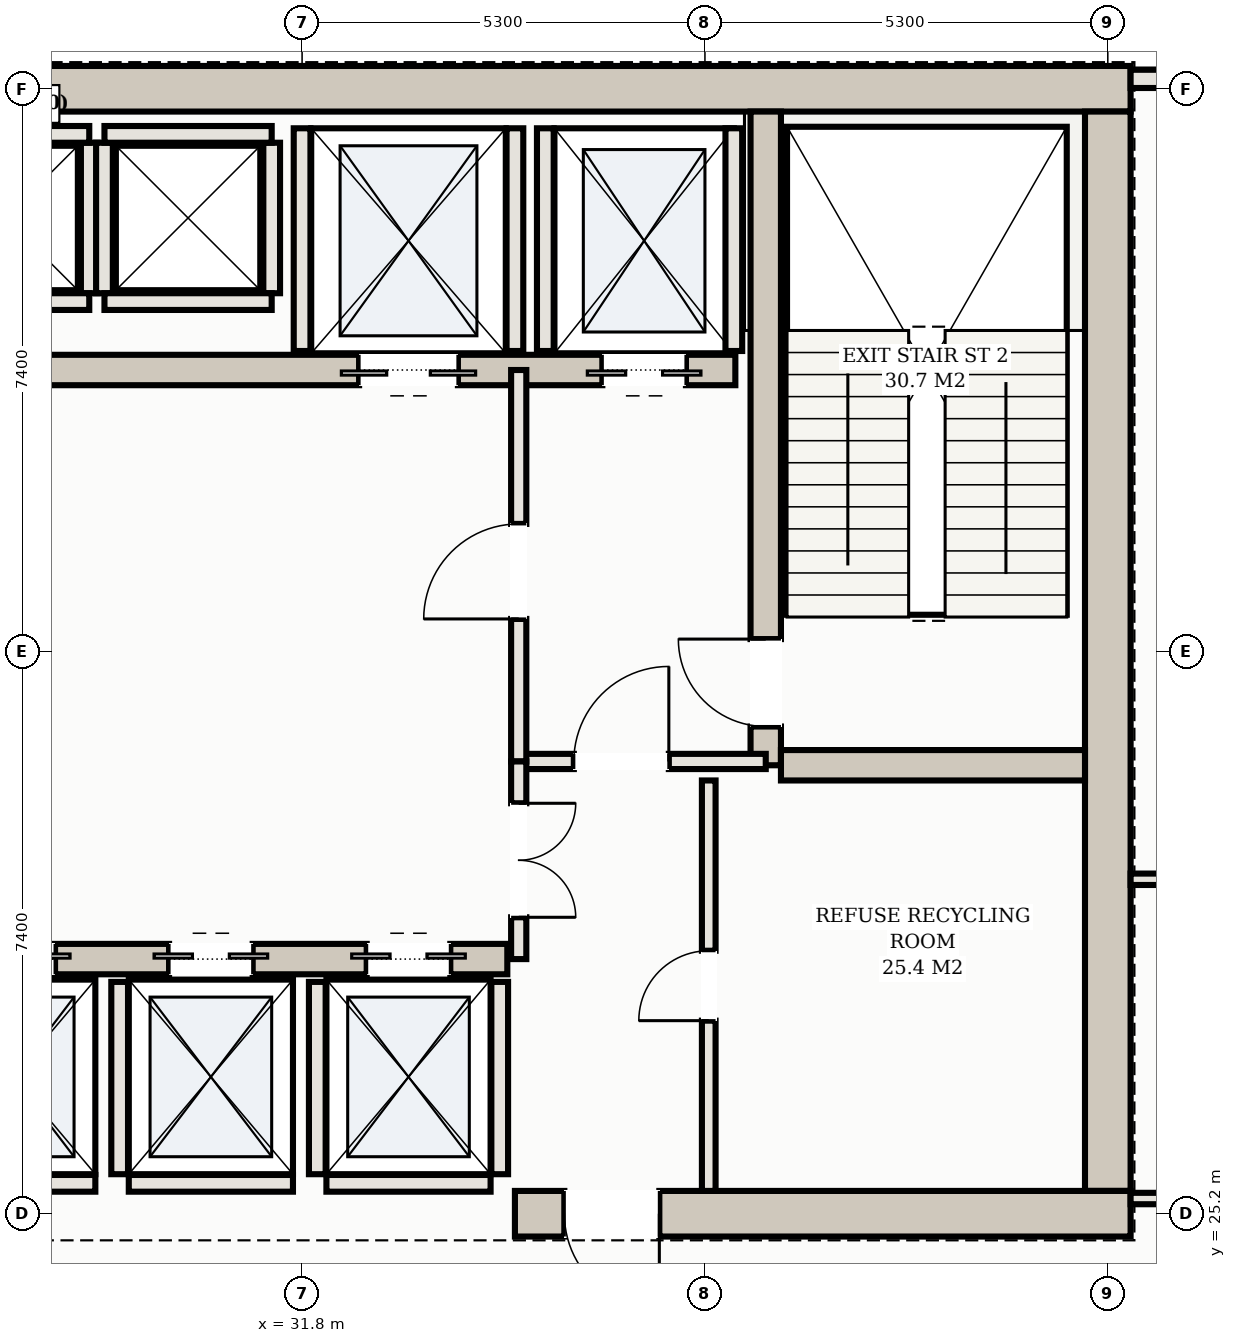
"""IFC4 building model, lengths in metres.
Left out: names, types, materials, properties, quantities, classifications, styles, units other than length and angle.
Written with IfcOpenShell. Run it as: python <this file> out.ifc"""

import sys

from ifc_helpers import new_model, si_unit, direction, frame, frame_2d, origin, place, context, subcontext, project, spatial, rectangle, extrude, element, fill, save


model = new_model("IFC4")
c1 = context("Model", 3, precision=1e-05, world=origin(), true_north=direction((0.0, 1.0)))
c2 = subcontext(c1, "Body", "Model", "MODEL_VIEW")
j1 = project(units=[si_unit("LENGTHUNIT", "METRE"), si_unit("PLANEANGLEUNIT", "RADIAN")], contexts=[c1])
p1 = place(None, origin())
s1 = spatial("IfcSite", under=j1, at=p1, CompositionType="ELEMENT")
p2 = place(p1, origin())
s2 = spatial("IfcBuilding", under=s1, at=p2, CompositionType="ELEMENT")
p3 = place(p2, frame((0.0, 0.0, 134.7)))
s3 = spatial("IfcBuildingStorey", under=s2, at=p3, CompositionType="ELEMENT", Elevation=134.7)
p4 = place(p3, frame((10.3, 40.0, 0.0), z_axis=(0.0, 0.0, 1.0), x_axis=(1.0, 0.0, 0.0)))
e1 = element("IfcWall", 1, at=p4, inside=s3, PredefinedType="SHEAR", context=c2, shape_type="SweptSolid", body=[
    extrude(rectangle(XDim=32.4, YDim=0.6, at=frame_2d((16.2, 0.0))), origin(), (0.0, 0.0, 1.0), 4.3),
])
p5 = place(p3, frame((42.4, 25.5, 0.0), z_axis=(0.0, 0.0, 1.0), x_axis=(0.0, 1.0, 0.0)))
e2 = element("IfcWall", 2, at=p5, inside=s3, PredefinedType="SHEAR", context=c2, shape_type="SweptSolid", body=[
    extrude(rectangle(XDim=14.2, YDim=0.6, at=frame_2d((7.1, 0.0))), origin(), (0.0, 0.0, 1.0), 4.3),
])
p6 = place(p3, frame((34.6, 25.2, 0.0), z_axis=(0.0, 0.0, 1.0), x_axis=(1.0, 0.0, 0.0)))
e3 = element("IfcWall", 3, at=p6, inside=s3, PredefinedType="SHEAR", context=c2, shape_type="SweptSolid", body=[
    extrude(rectangle(XDim=8.1, YDim=0.6, at=frame_2d((4.05, 0.0))), origin(), (0.0, 0.0, 1.0), 4.3),
])
p7 = place(p6, frame((0.65, 0.0, 0.0)))
e4 = element("IfcOpeningElement", 4, at=p7, cuts=e3, PredefinedType="OPENING", context=c2, shape_type="SweptSolid", body=[
    extrude(rectangle(XDim=1.25, YDim=2.2, at=frame_2d((0.625, 1.1))), frame((0.0, 0.31, 0.0), z_axis=(0.0, -1.0, 0.0), x_axis=(1.0, 0.0, 0.0)), (0.0, 0.0, 1.0), 0.62),
])
p8 = place(p3, frame((37.9, 31.1, 0.0), z_axis=(0.0, 0.0, 1.0), x_axis=(0.0, 1.0, 0.0)))
e5 = element("IfcWall", 5, at=p8, inside=s3, PredefinedType="SHEAR", context=c2, shape_type="SweptSolid", body=[
    extrude(rectangle(XDim=8.6, YDim=0.4, at=frame_2d((4.3, 0.0))), origin(), (0.0, 0.0, 1.0), 4.3),
])
p9 = place(p8, frame((0.51, 0.0, 0.0)))
e6 = element("IfcOpeningElement", 6, at=p9, cuts=e5, PredefinedType="OPENING", context=c2, shape_type="SweptSolid", body=[
    extrude(rectangle(XDim=1.15, YDim=2.2, at=frame_2d((0.575, 1.1))), frame((0.0, 0.21, 0.0), z_axis=(0.0, -1.0, 0.0), x_axis=(1.0, 0.0, 0.0)), (0.0, 0.0, 1.0), 0.42),
])
p10 = place(p3, frame((38.1, 31.1, 0.0), z_axis=(0.0, 0.0, 1.0), x_axis=(1.0, 0.0, 0.0)))
e7 = element("IfcWall", 7, at=p10, inside=s3, PredefinedType="SHEAR", context=c2, shape_type="SweptSolid", body=[
    extrude(rectangle(XDim=4.0, YDim=0.4, at=frame_2d((2.0, 0.0))), origin(), (0.0, 0.0, 1.0), 4.3),
])
p11 = place(p3, frame((15.5, 36.3, 0.0), z_axis=(0.0, 0.0, 1.0), x_axis=(1.0, 0.0, 0.0)))
e8 = element("IfcWall", 8, at=p11, inside=s3, PredefinedType="SHEAR", context=c2, shape_type="SweptSolid", body=[
    extrude(rectangle(XDim=22.0, YDim=0.4, at=frame_2d((11.0, 0.0))), origin(), (0.0, 0.0, 1.0), 4.3),
])
p12 = place(p11, frame((0.65, 0.0, 0.0)))
e9 = element("IfcOpeningElement", 9, at=p12, cuts=e8, PredefinedType="OPENING", context=c2, shape_type="SweptSolid", body=[
    extrude(rectangle(XDim=1.1, YDim=2.15, at=frame_2d((0.55, 1.075))), frame((0.0, 0.21, 0.0), z_axis=(0.0, -1.0, 0.0), x_axis=(1.0, 0.0, 0.0)), (0.0, 0.0, 1.0), 0.42),
])
p13 = place(p11, frame((20.25, 0.0, 0.0)))
e10 = element("IfcOpeningElement", 10, at=p13, cuts=e8, PredefinedType="OPENING", context=c2, shape_type="SweptSolid", body=[
    extrude(rectangle(XDim=1.1, YDim=2.15, at=frame_2d((0.55, 1.075))), frame((0.0, 0.21, 0.0), z_axis=(0.0, -1.0, 0.0), x_axis=(1.0, 0.0, 0.0)), (0.0, 0.0, 1.0), 0.42),
])
p14 = place(p11, frame((17.05, 0.0, 0.0)))
e11 = element("IfcOpeningElement", 11, at=p14, cuts=e8, PredefinedType="OPENING", context=c2, shape_type="SweptSolid", body=[
    extrude(rectangle(XDim=1.3, YDim=2.2, at=frame_2d((0.65, 1.1))), frame((0.0, 0.21, 0.0), z_axis=(0.0, -1.0, 0.0), x_axis=(1.0, 0.0, 0.0)), (0.0, 0.0, 1.0), 0.42),
])
p15 = place(p11, frame((3.95, 0.0, 0.0)))
e12 = element("IfcOpeningElement", 12, at=p15, cuts=e8, PredefinedType="OPENING", context=c2, shape_type="SweptSolid", body=[
    extrude(rectangle(XDim=1.1, YDim=2.15, at=frame_2d((0.55, 1.075))), frame((0.0, 0.21, 0.0), z_axis=(0.0, -1.0, 0.0), x_axis=(1.0, 0.0, 0.0)), (0.0, 0.0, 1.0), 0.42),
])
p16 = place(p11, frame((6.55, 0.0, 0.0)))
e13 = element("IfcOpeningElement", 13, at=p16, cuts=e8, PredefinedType="OPENING", context=c2, shape_type="SweptSolid", body=[
    extrude(rectangle(XDim=1.1, YDim=2.15, at=frame_2d((0.55, 1.075))), frame((0.0, 0.21, 0.0), z_axis=(0.0, -1.0, 0.0), x_axis=(1.0, 0.0, 0.0)), (0.0, 0.0, 1.0), 0.42),
])
p17 = place(p11, frame((9.15, 0.0, 0.0)))
e14 = element("IfcOpeningElement", 14, at=p17, cuts=e8, PredefinedType="OPENING", context=c2, shape_type="SweptSolid", body=[
    extrude(rectangle(XDim=1.1, YDim=2.15, at=frame_2d((0.55, 1.075))), frame((0.0, 0.21, 0.0), z_axis=(0.0, -1.0, 0.0), x_axis=(1.0, 0.0, 0.0)), (0.0, 0.0, 1.0), 0.42),
])
p18 = place(p3, frame((18.5, 28.55, 0.0), z_axis=(0.0, 0.0, 1.0), x_axis=(1.0, 0.0, 0.0)))
e15 = element("IfcWall", 15, at=p18, inside=s3, PredefinedType="SHEAR", context=c2, shape_type="SweptSolid", body=[
    extrude(rectangle(XDim=16.0, YDim=0.4, at=frame_2d((8.0, 0.0))), origin(), (0.0, 0.0, 1.0), 4.3),
])
p19 = place(p18, frame((8.95, 0.0, 0.0)))
e16 = element("IfcOpeningElement", 16, at=p19, cuts=e15, PredefinedType="OPENING", context=c2, shape_type="SweptSolid", body=[
    extrude(rectangle(XDim=1.1, YDim=2.15, at=frame_2d((0.55, 1.075))), frame((0.0, 0.21, 0.0), z_axis=(0.0, -1.0, 0.0), x_axis=(1.0, 0.0, 0.0)), (0.0, 0.0, 1.0), 0.42),
])
p20 = place(p18, frame((11.55, 0.0, 0.0)))
e17 = element("IfcOpeningElement", 17, at=p20, cuts=e15, PredefinedType="OPENING", context=c2, shape_type="SweptSolid", body=[
    extrude(rectangle(XDim=1.1, YDim=2.15, at=frame_2d((0.55, 1.075))), frame((0.0, 0.21, 0.0), z_axis=(0.0, -1.0, 0.0), x_axis=(1.0, 0.0, 0.0)), (0.0, 0.0, 1.0), 0.42),
])
p21 = place(p18, frame((14.15, 0.0, 0.0)))
e18 = element("IfcOpeningElement", 18, at=p21, cuts=e15, PredefinedType="OPENING", context=c2, shape_type="SweptSolid", body=[
    extrude(rectangle(XDim=1.1, YDim=2.15, at=frame_2d((0.55, 1.075))), frame((0.0, 0.21, 0.0), z_axis=(0.0, -1.0, 0.0), x_axis=(1.0, 0.0, 0.0)), (0.0, 0.0, 1.0), 0.42),
])
for number, where, z_axis, x_axis in (
    (19, (35.0, 36.55, 0.0), (0.0, 0.0, 1.0), (0.0, 1.0, 0.0)),
    (20, (37.48, 36.55, 0.0), (0.0, 0.0, 1.0), (0.0, 1.0, 0.0)),
    (21, (31.8, 36.55, 0.0), (0.0, 0.0, 1.0), (0.0, 1.0, 0.0)),
    (22, (34.6, 36.55, 0.0), (0.0, 0.0, 1.0), (0.0, 1.0, 0.0)),
):
    element("IfcWall", number, at=place(p3, frame(where, z_axis=z_axis, x_axis=x_axis)), inside=s3, PredefinedType="SOLIDWALL", context=c2, shape_type="SweptSolid", body=[
        extrude(rectangle(XDim=2.93, YDim=0.22, at=frame_2d((1.465, 0.0))), origin(), (0.0, 0.0, 1.0), 4.3),
    ])
p22 = place(p3, frame((26.92, 25.6, 0.0), z_axis=(0.0, 0.0, 1.0), x_axis=(1.0, 0.0, 0.0)))
e23 = element("IfcWall", 23, at=p22, inside=s3, PredefinedType="SOLIDWALL", context=c2, shape_type="SweptSolid", body=[
    extrude(rectangle(XDim=2.16, YDim=0.22, at=frame_2d((1.08, 0.0))), origin(), (0.0, 0.0, 1.0), 3.495),
])
p23 = place(p3, frame((29.4, 25.72, 0.0), z_axis=(0.0, 0.0, 1.0), x_axis=(0.0, 1.0, 0.0)))
e24 = element("IfcWall", 24, at=p23, inside=s3, PredefinedType="SOLIDWALL", context=c2, shape_type="SweptSolid", body=[
    extrude(rectangle(XDim=2.53, YDim=0.22, at=frame_2d((1.265, 0.0))), origin(), (0.0, 0.0, 1.0), 4.3),
])
p24 = place(p3, frame((29.52, 25.6, 0.0), z_axis=(0.0, 0.0, 1.0), x_axis=(1.0, 0.0, 0.0)))
e25 = element("IfcWall", 25, at=p24, inside=s3, PredefinedType="SOLIDWALL", context=c2, shape_type="SweptSolid", body=[
    extrude(rectangle(XDim=2.16, YDim=0.22, at=frame_2d((1.08, 0.0))), origin(), (0.0, 0.0, 1.0), 3.495),
])
for number, where, z_axis, x_axis in (
    (26, (32.0, 25.72, 0.0), (0.0, 0.0, 1.0), (0.0, 1.0, 0.0)),
    (27, (34.4, 25.72, 0.0), (0.0, 0.0, 1.0), (0.0, 1.0, 0.0)),
):
    element("IfcWall", number, at=place(p3, frame(where, z_axis=z_axis, x_axis=x_axis)), inside=s3, PredefinedType="SOLIDWALL", context=c2, shape_type="SweptSolid", body=[
        extrude(rectangle(XDim=2.53, YDim=0.22, at=frame_2d((1.265, 0.0))), origin(), (0.0, 0.0, 1.0), 4.3),
    ])
p25 = place(p3, frame((32.12, 25.6, 0.0), z_axis=(0.0, 0.0, 1.0), x_axis=(1.0, 0.0, 0.0)))
e28 = element("IfcWall", 28, at=p25, inside=s3, PredefinedType="SOLIDWALL", context=c2, shape_type="SweptSolid", body=[
    extrude(rectangle(XDim=2.16, YDim=0.22, at=frame_2d((1.08, 0.0))), origin(), (0.0, 0.0, 1.0), 3.495),
])
p26 = place(p3, frame((29.0, 37.31, 0.0), z_axis=(0.0, 0.0, 1.0), x_axis=(0.0, 1.0, 0.0)))
e29 = element("IfcWall", 29, at=p26, inside=s3, PredefinedType="SOLIDWALL", context=c2, shape_type="SweptSolid", body=[
    extrude(rectangle(XDim=1.98, YDim=0.22, at=frame_2d((0.99, 0.0))), origin(), (0.0, 0.0, 1.0), 4.3),
])
for number, where, z_axis, x_axis in (
    (30, (26.8, 39.4, 0.0), (0.0, 0.0, 1.0), (1.0, 0.0, 0.0)),
    (31, (26.8, 37.2, 0.0), (0.0, 0.0, 1.0), (1.0, 0.0, 0.0)),
):
    element("IfcWall", number, at=place(p3, frame(where, z_axis=z_axis, x_axis=x_axis)), inside=s3, PredefinedType="SOLIDWALL", context=c2, shape_type="SweptSolid", body=[
        extrude(rectangle(XDim=2.2, YDim=0.22, at=frame_2d((1.1, 0.0))), origin(), (0.0, 0.0, 1.0), 4.3),
    ])
for number, where, z_axis, x_axis in (
    (32, (29.2, 37.31, 0.0), (0.0, 0.0, 1.0), (0.0, 1.0, 0.0)),
    (33, (31.4, 37.31, 0.0), (0.0, 0.0, 1.0), (0.0, 1.0, 0.0)),
):
    element("IfcWall", number, at=place(p3, frame(where, z_axis=z_axis, x_axis=x_axis)), inside=s3, PredefinedType="SOLIDWALL", context=c2, shape_type="SweptSolid", body=[
        extrude(rectangle(XDim=1.98, YDim=0.22, at=frame_2d((0.99, 0.0))), origin(), (0.0, 0.0, 1.0), 4.3),
    ])
for number, where, z_axis, x_axis in (
    (34, (29.2, 39.4, 0.0), (0.0, 0.0, 1.0), (1.0, 0.0, 0.0)),
    (35, (29.2, 37.2, 0.0), (0.0, 0.0, 1.0), (1.0, 0.0, 0.0)),
):
    element("IfcWall", number, at=place(p3, frame(where, z_axis=z_axis, x_axis=x_axis)), inside=s3, PredefinedType="SOLIDWALL", context=c2, shape_type="SweptSolid", body=[
        extrude(rectangle(XDim=2.2, YDim=0.22, at=frame_2d((1.1, 0.0))), origin(), (0.0, 0.0, 1.0), 4.3),
    ])
p27 = place(p3, frame((44.35, 40.13, 0.0), z_axis=(0.0, 0.0, 1.0), x_axis=(-1.0, 0.0, 0.0)))
e36 = element("IfcWall", 36, at=p27, inside=s3, PredefinedType="SOLIDWALL", context=c2, shape_type="SweptSolid", body=[
    extrude(rectangle(XDim=1.65, YDim=0.24, at=frame_2d((0.825, 0.0))), origin(), (0.0, 0.0, 1.0), 4.3),
])
p28 = place(p3, frame((34.65, 31.15, 0.0), z_axis=(0.0, 0.0, 1.0), x_axis=(1.0, 0.0, 0.0)))
e37 = element("IfcWall", 37, at=p28, inside=s3, PredefinedType="PARTITIONING", context=c2, shape_type="SweptSolid", body=[
    extrude(rectangle(XDim=3.25, YDim=0.2, at=frame_2d((1.625, 0.0))), origin(), (0.0, 0.0, 1.0), 4.3),
])
p29 = place(p28, frame((0.725, 0.0, 0.0)))
e38 = element("IfcOpeningElement", 38, at=p29, cuts=e37, PredefinedType="OPENING", context=c2, shape_type="SweptSolid", body=[
    extrude(rectangle(XDim=1.25, YDim=2.2, at=frame_2d((0.625, 1.1))), frame((0.0, 0.11, 0.0), z_axis=(0.0, -1.0, 0.0), x_axis=(1.0, 0.0, 0.0)), (0.0, 0.0, 1.0), 0.22),
])
p30 = place(p3, frame((34.65, 31.15, 0.0), z_axis=(0.0, 0.0, 1.0), x_axis=(0.0, 1.0, 0.0)))
e39 = element("IfcWall", 39, at=p30, inside=s3, PredefinedType="PARTITIONING", context=c2, shape_type="SweptSolid", body=[
    extrude(rectangle(XDim=5.15, YDim=0.2, at=frame_2d((2.575, 0.0))), origin(), (0.0, 0.0, 1.0), 4.3),
])
p31 = place(p30, frame((1.875, 0.0, 0.0)))
e40 = element("IfcOpeningElement", 40, at=p31, cuts=e39, PredefinedType="OPENING", context=c2, shape_type="SweptSolid", body=[
    extrude(rectangle(XDim=1.25, YDim=2.2, at=frame_2d((0.625, 1.1))), frame((0.0, 0.11, 0.0), z_axis=(0.0, -1.0, 0.0), x_axis=(1.0, 0.0, 0.0)), (0.0, 0.0, 1.0), 0.22),
])
p32 = place(p3, frame((37.15, 25.5, 0.0), z_axis=(0.0, 0.0, 1.0), x_axis=(0.0, 1.0, 0.0)))
e41 = element("IfcWall", 41, at=p32, inside=s3, PredefinedType="PARTITIONING", context=c2, shape_type="SweptSolid", body=[
    extrude(rectangle(XDim=5.4, YDim=0.18, at=frame_2d((2.7, 0.0))), origin(), (0.0, 0.0, 1.0), 4.3),
])
p33 = place(p32, frame((2.24, 0.0, 0.0)))
e42 = element("IfcOpeningElement", 42, at=p33, cuts=e41, PredefinedType="OPENING", context=c2, shape_type="SweptSolid", body=[
    extrude(rectangle(XDim=0.92, YDim=2.15, at=frame_2d((0.46, 1.075))), frame((0.0, 0.1, 0.0), z_axis=(0.0, -1.0, 0.0), x_axis=(1.0, 0.0, 0.0)), (0.0, 0.0, 1.0), 0.2),
])
p34 = place(p3, frame((34.65, 28.55, 0.0), z_axis=(0.0, 0.0, 1.0), x_axis=(0.0, 1.0, 0.0)))
e43 = element("IfcWall", 43, at=p34, inside=s3, PredefinedType="PARTITIONING", context=c2, shape_type="SweptSolid", body=[
    extrude(rectangle(XDim=2.6, YDim=0.2, at=frame_2d((1.3, 0.0))), origin(), (0.0, 0.0, 1.0), 4.3),
])
p35 = place(p34, frame((0.55, 0.0, 0.0)))
e44 = element("IfcOpeningElement", 44, at=p35, cuts=e43, PredefinedType="OPENING", context=c2, shape_type="SweptSolid", body=[
    extrude(rectangle(XDim=1.5, YDim=2.25, at=frame_2d((0.75, 1.125))), frame((0.0, 0.11, 0.0), z_axis=(0.0, -1.0, 0.0), x_axis=(1.0, 0.0, 0.0)), (0.0, 0.0, 1.0), 0.22),
])
p36 = place(p3, frame((42.7, 25.4, 0.0), z_axis=(0.0, 0.0, 1.0), x_axis=(1.0, 0.0, 0.0)))
e45 = element("IfcWall", 45, at=p36, inside=s3, PredefinedType="PARTITIONING", context=c2, shape_type="SweptSolid", body=[
    extrude(rectangle(XDim=3.1, YDim=0.15, at=frame_2d((1.55, 0.0))), origin(), (0.0, 0.0, 1.0), 3.595),
])
p37 = place(p36, frame((1.1, 0.0, 0.0)))
e46 = element("IfcOpeningElement", 46, at=p37, cuts=e45, PredefinedType="OPENING", context=c2, shape_type="SweptSolid", body=[
    extrude(rectangle(XDim=0.9, YDim=2.15, at=frame_2d((0.45, 1.075))), frame((0.0, 0.085, 0.0), z_axis=(0.0, -1.0, 0.0), x_axis=(1.0, 0.0, 0.0)), (0.0, 0.0, 1.0), 0.17),
])
p38 = place(p3, frame((42.7, 29.6, 0.0), z_axis=(0.0, 0.0, 1.0), x_axis=(1.0, 0.0, 0.0)))
e47 = element("IfcWall", 47, at=p38, inside=s3, PredefinedType="PARTITIONING", context=c2, shape_type="SweptSolid", body=[
    extrude(rectangle(XDim=3.1, YDim=0.15, at=frame_2d((1.55, 0.0))), origin(), (0.0, 0.0, 1.0), 4.3),
])
p39 = place(p13, frame((1.1, 0.0, 0.0), z_axis=(0.0, 0.0, 1.0), x_axis=(-1.0, 0.0, 0.0)))
e48 = element("IfcDoor", 48, at=p39, inside=s3, OperationType="DOUBLE_DOOR_SLIDING", PredefinedType="DOOR", context=c2, shape_type="SweptSolid", body=[
    extrude(rectangle(XDim=1.1, YDim=2.15, at=frame_2d((0.55, 1.075))), frame((0.0, 0.025, 0.0), z_axis=(0.0, -1.0, 0.0), x_axis=(1.0, 0.0, 0.0)), (0.0, 0.0, 1.0), 0.05),
])
fill(e10, e48)
p40 = place(p14, frame((1.3, 0.0, 0.0), z_axis=(0.0, 0.0, 1.0), x_axis=(-1.0, 0.0, 0.0)))
e49 = element("IfcDoor", 49, at=p40, inside=s3, OperationType="DOUBLE_DOOR_SLIDING", PredefinedType="DOOR", context=c2, shape_type="SweptSolid", body=[
    extrude(rectangle(XDim=1.3, YDim=2.2, at=frame_2d((0.65, 1.1))), frame((0.0, 0.025, 0.0), z_axis=(0.0, -1.0, 0.0), x_axis=(1.0, 0.0, 0.0)), (0.0, 0.0, 1.0), 0.05),
])
fill(e11, e49)
p41 = place(p19, origin())
e50 = element("IfcDoor", 50, at=p41, inside=s3, OperationType="DOUBLE_DOOR_SLIDING", PredefinedType="DOOR", context=c2, shape_type="SweptSolid", body=[
    extrude(rectangle(XDim=1.1, YDim=2.15, at=frame_2d((0.55, 1.075))), frame((0.0, 0.025, 0.0), z_axis=(0.0, -1.0, 0.0), x_axis=(1.0, 0.0, 0.0)), (0.0, 0.0, 1.0), 0.05),
])
fill(e16, e50)
p42 = place(p20, origin())
e51 = element("IfcDoor", 51, at=p42, inside=s3, OperationType="DOUBLE_DOOR_SLIDING", PredefinedType="DOOR", context=c2, shape_type="SweptSolid", body=[
    extrude(rectangle(XDim=1.1, YDim=2.15, at=frame_2d((0.55, 1.075))), frame((0.0, 0.025, 0.0), z_axis=(0.0, -1.0, 0.0), x_axis=(1.0, 0.0, 0.0)), (0.0, 0.0, 1.0), 0.05),
])
fill(e17, e51)
p43 = place(p21, origin())
e52 = element("IfcDoor", 52, at=p43, inside=s3, OperationType="DOUBLE_DOOR_SLIDING", PredefinedType="DOOR", context=c2, shape_type="SweptSolid", body=[
    extrude(rectangle(XDim=1.1, YDim=2.15, at=frame_2d((0.55, 1.075))), frame((0.0, 0.025, 0.0), z_axis=(0.0, -1.0, 0.0), x_axis=(1.0, 0.0, 0.0)), (0.0, 0.0, 1.0), 0.05),
])
fill(e18, e52)
p44 = place(p7, frame((1.25, 0.0, 0.0), z_axis=(0.0, 0.0, 1.0), x_axis=(-1.0, 0.0, 0.0)))
e53 = element("IfcDoor", 53, at=p44, inside=s3, OperationType="SINGLE_SWING_LEFT", PredefinedType="DOOR", context=c2, shape_type="SweptSolid", body=[
    extrude(rectangle(XDim=1.25, YDim=2.2, at=frame_2d((0.625, 1.1))), frame((0.0, 0.025, 0.0), z_axis=(0.0, -1.0, 0.0), x_axis=(1.0, 0.0, 0.0)), (0.0, 0.0, 1.0), 0.05),
])
fill(e4, e53)
p45 = place(p29, origin())
e54 = element("IfcDoor", 54, at=p45, inside=s3, OperationType="SINGLE_SWING_RIGHT", PredefinedType="DOOR", context=c2, shape_type="SweptSolid", body=[
    extrude(rectangle(XDim=1.25, YDim=2.2, at=frame_2d((0.625, 1.1))), frame((0.0, 0.025, 0.0), z_axis=(0.0, -1.0, 0.0), x_axis=(1.0, 0.0, 0.0)), (0.0, 0.0, 1.0), 0.05),
])
fill(e38, e54)
p46 = place(p31, origin())
e55 = element("IfcDoor", 55, at=p46, inside=s3, OperationType="SINGLE_SWING_LEFT", PredefinedType="DOOR", context=c2, shape_type="SweptSolid", body=[
    extrude(rectangle(XDim=1.25, YDim=2.2, at=frame_2d((0.625, 1.1))), frame((0.0, 0.025, 0.0), z_axis=(0.0, -1.0, 0.0), x_axis=(1.0, 0.0, 0.0)), (0.0, 0.0, 1.0), 0.05),
])
fill(e40, e55)
p47 = place(p9, origin())
e56 = element("IfcDoor", 56, at=p47, inside=s3, OperationType="SINGLE_SWING_RIGHT", PredefinedType="DOOR", context=c2, shape_type="SweptSolid", body=[
    extrude(rectangle(XDim=1.15, YDim=2.2, at=frame_2d((0.575, 1.1))), frame((0.0, 0.025, 0.0), z_axis=(0.0, -1.0, 0.0), x_axis=(1.0, 0.0, 0.0)), (0.0, 0.0, 1.0), 0.05),
])
fill(e6, e56)
p48 = place(p33, origin())
e57 = element("IfcDoor", 57, at=p48, inside=s3, OperationType="SINGLE_SWING_LEFT", PredefinedType="DOOR", context=c2, shape_type="SweptSolid", body=[
    extrude(rectangle(XDim=0.92, YDim=2.15, at=frame_2d((0.46, 1.075))), frame((0.0, 0.025, 0.0), z_axis=(0.0, -1.0, 0.0), x_axis=(1.0, 0.0, 0.0)), (0.0, 0.0, 1.0), 0.05),
])
fill(e42, e57)
p49 = place(p35, frame((1.5, 0.0, 0.0), z_axis=(0.0, 0.0, 1.0), x_axis=(-1.0, 0.0, 0.0)))
e58 = element("IfcDoor", 58, at=p49, inside=s3, OperationType="DOUBLE_DOOR_SINGLE_SWING", PredefinedType="DOOR", context=c2, shape_type="SweptSolid", body=[
    extrude(rectangle(XDim=1.5, YDim=2.25, at=frame_2d((0.75, 1.125))), frame((0.0, 0.025, 0.0), z_axis=(0.0, -1.0, 0.0), x_axis=(1.0, 0.0, 0.0)), (0.0, 0.0, 1.0), 0.05),
])
fill(e44, e58)
save(model, sys.argv[1])
